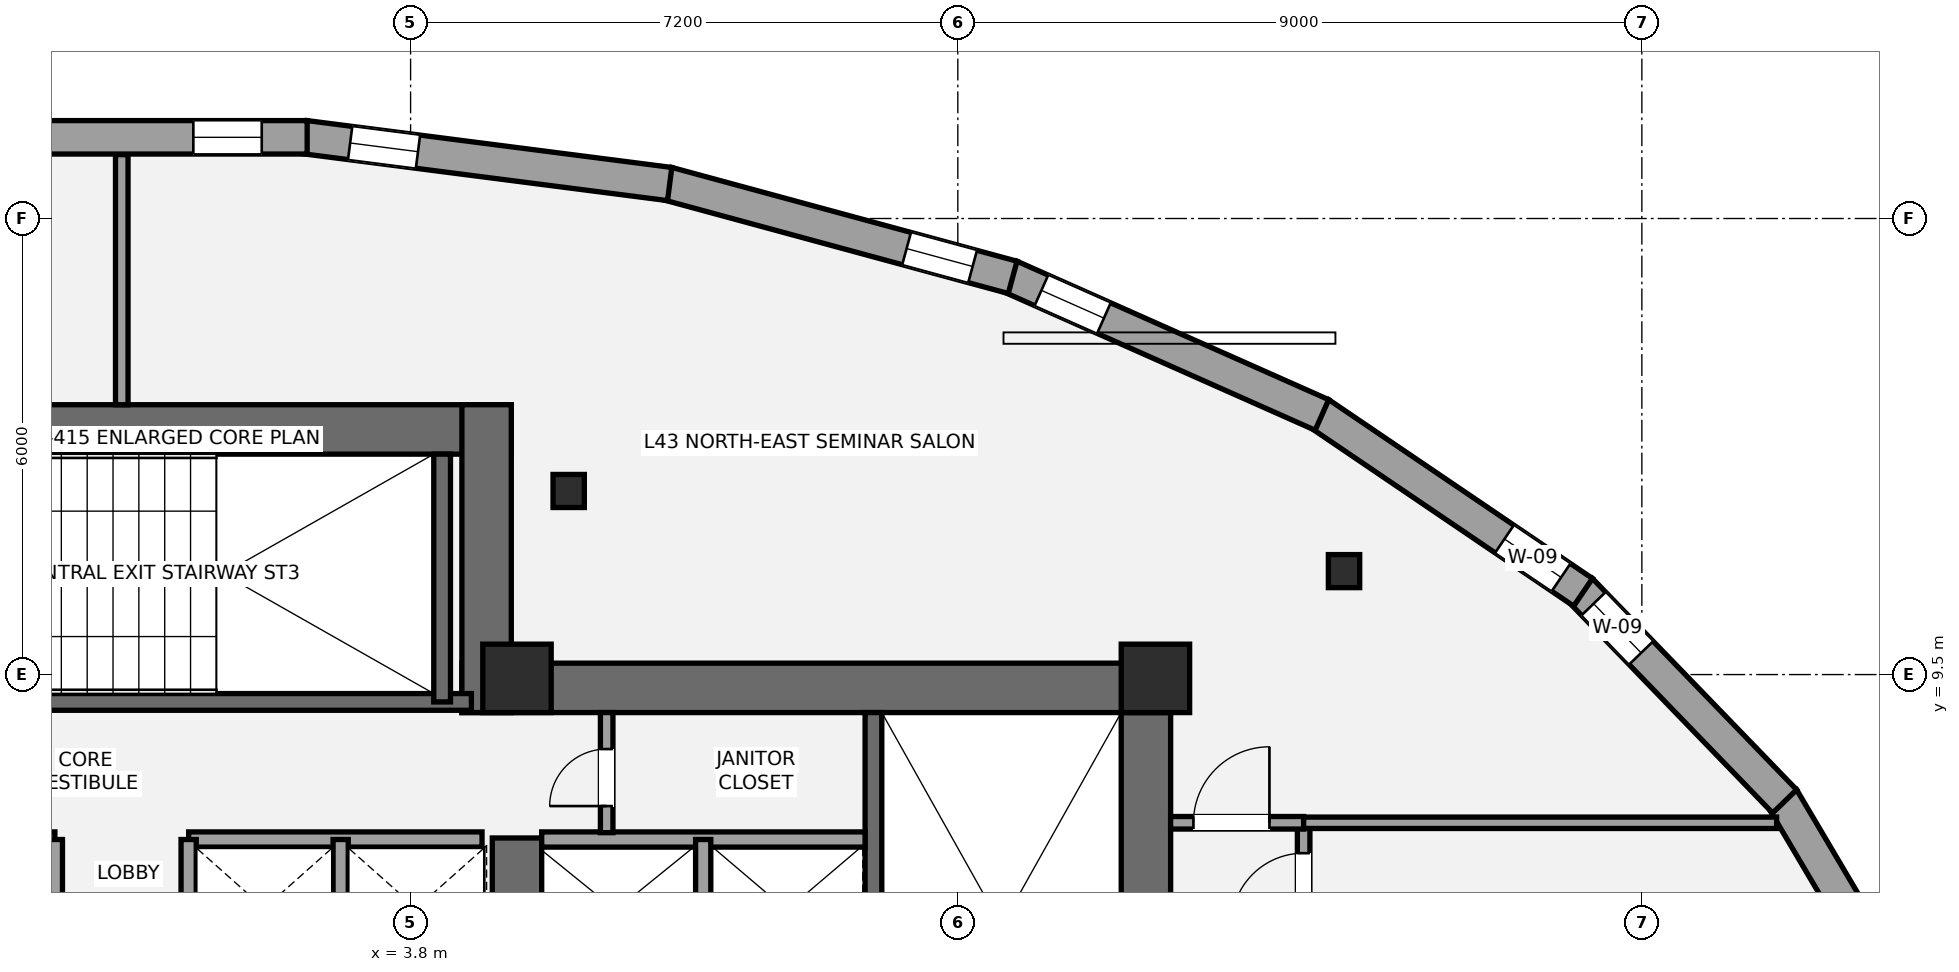
"""IFC4 building model, lengths in metres.
Left out: names, types, materials, properties, quantities, classifications, styles, units other than length and angle.
Written with IfcOpenShell. Run it as: python <this file> out.ifc"""

import sys

from ifc_helpers import new_model, si_unit, direction, frame, frame_2d, origin, origin_2d, place, context, subcontext, project, spatial, rectangle, i_section, extrude, element, fill, save


model = new_model("IFC4")
c1 = context("Model", 3, precision=1e-05, world=origin(), true_north=direction((0.0, 1.0)))
c2 = subcontext(c1, "Body", "Model", "MODEL_VIEW")
j1 = project(units=[si_unit("LENGTHUNIT", "METRE"), si_unit("PLANEANGLEUNIT", "RADIAN")], contexts=[c1])
p1 = place(None, origin())
s1 = spatial("IfcSite", under=j1, at=p1, CompositionType="ELEMENT")
p2 = place(p1, origin())
s2 = spatial("IfcBuilding", under=s1, at=p2, CompositionType="ELEMENT")
p3 = place(p2, frame((0.0, 0.0, 159.8)))
s3 = spatial("IfcBuildingStorey", under=s2, at=p3, CompositionType="ELEMENT", Elevation=159.8)
p4 = place(p3, frame((13.475, 1.2, 0.0), z_axis=(0.0, 0.0, 1.0), x_axis=(0.0, 1.0, 0.0)))
e1 = element("IfcWall", 1, at=p4, inside=s3, PredefinedType="SHEAR", context=c2, shape_type="SweptSolid", body=[
    extrude(rectangle(XDim=8.45, YDim=0.65, at=frame_2d((4.225, 0.0))), origin(), (0.0, 0.0, 1.0), 3.2),
])
p5 = place(p3, frame((4.475, 9.325, 0.0), z_axis=(0.0, 0.0, 1.0), x_axis=(1.0, 0.0, 0.0)))
e2 = element("IfcWall", 2, at=p5, inside=s3, PredefinedType="SHEAR", context=c2, shape_type="SweptSolid", body=[
    extrude(rectangle(XDim=9.325, YDim=0.65, at=frame_2d((4.663, 0.0))), origin(), (0.0, 0.0, 1.0), 3.2),
])
p6 = place(p3, frame((5.2, 5.35, 0.0), z_axis=(0.0, 0.0, 1.0), x_axis=(0.0, 1.0, 0.0)))
e3 = element("IfcWall", 3, at=p6, inside=s3, PredefinedType="SHEAR", context=c2, shape_type="SweptSolid", body=[
    extrude(rectangle(XDim=2.0, YDim=0.65, at=frame_2d((1.0, 0.0))), origin(), (0.0, 0.0, 1.0), 3.2),
])
p7 = place(p3, frame((9.89, 1.85, 0.0), z_axis=(0.0, 0.0, 1.0), x_axis=(0.0, 1.0, 0.0)))
e4 = element("IfcWall", 4, at=p7, inside=s3, PredefinedType="SHEAR", context=c2, shape_type="SweptSolid", body=[
    extrude(rectangle(XDim=7.15, YDim=0.22, at=frame_2d((3.575, 0.0))), origin(), (0.0, 0.0, 1.0), 3.2),
])
p8 = place(p3, frame((-5.125, 12.725, 0.0), z_axis=(0.0, 0.0, 1.0), x_axis=(1.0, 0.0, 0.0)))
e5 = element("IfcWall", 5, at=p8, inside=s3, PredefinedType="SHEAR", context=c2, shape_type="SweptSolid", body=[
    extrude(rectangle(XDim=10.25, YDim=0.65, at=frame_2d((5.125, 0.0))), origin(), (0.0, 0.0, 1.0), 3.2),
])
p9 = place(p3, frame((4.8, 9.0, 0.0), z_axis=(0.0, 0.0, 1.0), x_axis=(0.0, 1.0, 0.0)))
e6 = element("IfcWall", 6, at=p9, inside=s3, PredefinedType="SHEAR", context=c2, shape_type="SweptSolid", body=[
    extrude(rectangle(XDim=4.05, YDim=0.65, at=frame_2d((2.025, 0.0))), origin(), (0.0, 0.0, 1.0), 3.2),
])
p10 = place(p3, frame((-4.7, 9.14, 0.0), z_axis=(0.0, 0.0, 1.0), x_axis=(1.0, 0.0, 0.0)))
e7 = element("IfcWall", 7, at=p10, inside=s3, PredefinedType="SHEAR", context=c2, shape_type="SweptSolid", body=[
    extrude(rectangle(XDim=9.3, YDim=0.22, at=frame_2d((4.65, 0.0))), origin(), (0.0, 0.0, 1.0), 3.2),
])
p11 = place(p10, frame((1.15, 0.0, 0.0)))
e8 = element("IfcOpeningElement", 8, at=p11, cuts=e7, PredefinedType="OPENING", context=c2, shape_type="SweptSolid", body=[
    extrude(rectangle(XDim=1.05, YDim=2.15, at=frame_2d((0.525, 1.075))), frame((0.0, 0.12, 0.0), z_axis=(0.0, -1.0, 0.0), x_axis=(1.0, 0.0, 0.0)), (0.0, 0.0, 1.0), 0.24),
])
p12 = place(p3, frame((4.215, 9.14, 0.0), z_axis=(0.0, 0.0, 1.0), x_axis=(0.0, 1.0, 0.0)))
e9 = element("IfcWall", 9, at=p12, inside=s3, PredefinedType="SHEAR", context=c2, shape_type="SweptSolid", body=[
    extrude(rectangle(XDim=3.26, YDim=0.22, at=frame_2d((1.63, 0.0))), origin(), (0.0, 0.0, 1.0), 3.2),
])
for number, where, z_axis, x_axis in (
    (10, (5.2, 9.45, 0.0), (0.0, 0.0, 1.0), (1.0, 0.0, 0.0)),
    (11, (13.6, 9.45, 0.0), (0.0, 0.0, 1.0), (1.0, 0.0, 0.0)),
):
    element("IfcColumn", number, at=place(p3, frame(where, z_axis=z_axis, x_axis=x_axis)), inside=s3, PredefinedType="COLUMN", context=c2, shape_type="SweptSolid", body=[
        extrude(rectangle(XDim=0.9, YDim=0.9, at=origin_2d()), origin(), (0.0, 0.0, 1.0), 3.2),
    ])
for number, where, z_axis, x_axis in (
    (12, (16.082, 10.861, 0.0), (0.0, 0.0, 1.0), (1.0, 0.0, 0.0)),
    (13, (5.88, 11.915, 0.0), (0.0, 0.0, 1.0), (1.0, 0.0, 0.0)),
):
    element("IfcColumn", number, at=place(p3, frame(where, z_axis=z_axis, x_axis=x_axis)), inside=s3, PredefinedType="COLUMN", context=c2, shape_type="SweptSolid", body=[
        extrude(i_section(OverallWidth=0.412, OverallDepth=0.435, WebThickness=0.036, FlangeThickness=0.057, at=origin_2d()), origin(), (0.0, 0.0, 1.0), 3.2),
    ])
p13 = place(p3, frame((21.847, 7.873, 0.0), z_axis=(0.0, 0.0, 1.0), x_axis=(0.508883387051, -0.860835465338, 0.0)))
e14 = element("IfcWall", 14, at=p13, inside=s3, PredefinedType="STANDARD", context=c2, shape_type="SweptSolid", body=[
    extrude(rectangle(XDim=3.577, YDim=0.44, at=frame_2d((1.788, 0.0))), origin(), (0.0, 0.0, 1.0), 2.315),
])
p14 = place(p13, frame((2.537, 0.0, 0.42)))
e15 = element("IfcOpeningElement", 15, at=p14, cuts=e14, PredefinedType="OPENING", context=c2, shape_type="SweptSolid", body=[
    extrude(rectangle(XDim=0.9, YDim=1.35, at=frame_2d((0.45, 0.675))), frame((0.0, 0.23, 0.0), z_axis=(0.0, -1.0, 0.0), x_axis=(1.0, 0.0, 0.0)), (0.0, 0.0, 1.0), 0.46),
])
p15 = place(p3, frame((19.192, 10.612, 0.0), z_axis=(0.0, 0.0, 1.0), x_axis=(0.694975307772, -0.719033602544, 0.0)))
e16 = element("IfcWall", 16, at=p15, inside=s3, PredefinedType="STANDARD", context=c2, shape_type="SweptSolid", body=[
    extrude(rectangle(XDim=3.866, YDim=0.44, at=frame_2d((1.933, 0.0))), origin(), (0.0, 0.0, 1.0), 2.315),
])
p16 = place(p15, frame((0.25, 0.0, 0.42)))
e17 = element("IfcOpeningElement", 17, at=p16, cuts=e16, PredefinedType="OPENING", context=c2, shape_type="SweptSolid", body=[
    extrude(rectangle(XDim=0.9, YDim=1.35, at=frame_2d((0.45, 0.675))), frame((0.0, 0.23, 0.0), z_axis=(0.0, -1.0, 0.0), x_axis=(1.0, 0.0, 0.0)), (0.0, 0.0, 1.0), 0.46),
])
p17 = place(p3, frame((15.757, 12.935, 0.0), z_axis=(0.0, 0.0, 1.0), x_axis=(0.827760762475, -0.561081206338, 0.0)))
e18 = element("IfcWall", 18, at=p17, inside=s3, PredefinedType="STANDARD", context=c2, shape_type="SweptSolid", body=[
    extrude(rectangle(XDim=4.192, YDim=0.44, at=frame_2d((2.096, 0.0))), origin(), (0.0, 0.0, 1.0), 2.315),
])
p18 = place(p17, frame((2.942, 0.0, 0.58)))
e19 = element("IfcOpeningElement", 19, at=p18, cuts=e18, PredefinedType="OPENING", context=c2, shape_type="SweptSolid", body=[
    extrude(rectangle(XDim=0.9, YDim=1.35, at=frame_2d((0.45, 0.675))), frame((0.0, 0.23, 0.0), z_axis=(0.0, -1.0, 0.0), x_axis=(1.0, 0.0, 0.0)), (0.0, 0.0, 1.0), 0.46),
])
p19 = place(p3, frame((11.69, 14.737, 0.0), z_axis=(0.0, 0.0, 1.0), x_axis=(0.913907994914, -0.405921392431, 0.0)))
e20 = element("IfcWall", 20, at=p19, inside=s3, PredefinedType="STANDARD", context=c2, shape_type="SweptSolid", body=[
    extrude(rectangle(XDim=4.487, YDim=0.44, at=frame_2d((2.244, 0.0))), origin(), (0.0, 0.0, 1.0), 2.315),
])
p20 = place(p19, frame((0.449, 0.0, 0.58)))
e21 = element("IfcOpeningElement", 21, at=p20, cuts=e20, PredefinedType="OPENING", context=c2, shape_type="SweptSolid", body=[
    extrude(rectangle(XDim=0.9, YDim=1.35, at=frame_2d((0.45, 0.675))), frame((0.0, 0.23, 0.0), z_axis=(0.0, -1.0, 0.0), x_axis=(1.0, 0.0, 0.0)), (0.0, 0.0, 1.0), 0.46),
])
p21 = place(p3, frame((7.179, 15.959, 0.0), z_axis=(0.0, 0.0, 1.0), x_axis=(0.965037424263, -0.262112132058, 0.0)))
e22 = element("IfcWall", 22, at=p21, inside=s3, PredefinedType="STANDARD", context=c2, shape_type="SweptSolid", body=[
    extrude(rectangle(XDim=4.707, YDim=0.44, at=frame_2d((2.353, 0.0))), origin(), (0.0, 0.0, 1.0), 2.315),
])
p22 = place(p21, frame((3.261, 0.0, 0.58)))
e23 = element("IfcOpeningElement", 23, at=p22, cuts=e22, PredefinedType="OPENING", context=c2, shape_type="SweptSolid", body=[
    extrude(rectangle(XDim=0.9, YDim=1.35, at=frame_2d((0.45, 0.675))), frame((0.0, 0.23, 0.0), z_axis=(0.0, -1.0, 0.0), x_axis=(1.0, 0.0, 0.0)), (0.0, 0.0, 1.0), 0.46),
])
p23 = place(p3, frame((2.411, 16.57, 0.0), z_axis=(0.0, 0.0, 1.0), x_axis=(0.991852910824, -0.127388395426, 0.0)))
e24 = element("IfcWall", 24, at=p23, inside=s3, PredefinedType="STANDARD", context=c2, shape_type="SweptSolid", body=[
    extrude(rectangle(XDim=4.837, YDim=0.44, at=frame_2d((2.418, 0.0))), origin(), (0.0, 0.0, 1.0), 2.315),
])
p24 = place(p23, frame((0.598, 0.0, 0.58)))
e25 = element("IfcOpeningElement", 25, at=p24, cuts=e24, PredefinedType="OPENING", context=c2, shape_type="SweptSolid", body=[
    extrude(rectangle(XDim=0.9, YDim=1.35, at=frame_2d((0.45, 0.675))), frame((0.0, 0.23, 0.0), z_axis=(0.0, -1.0, 0.0), x_axis=(1.0, 0.0, 0.0)), (0.0, 0.0, 1.0), 0.46),
])
p25 = place(p3, frame((-2.439, 16.568, 0.0), z_axis=(0.0, 0.0, 1.0), x_axis=(1.0, 0.0, 0.0)))
e26 = element("IfcWall", 26, at=p25, inside=s3, PredefinedType="STANDARD", context=c2, shape_type="SweptSolid", body=[
    extrude(rectangle(XDim=4.878, YDim=0.44, at=frame_2d((2.439, 0.0))), origin(), (0.0, 0.0, 1.0), 2.315),
])
p26 = place(p25, frame((3.381, 0.0, 0.58)))
e27 = element("IfcOpeningElement", 27, at=p26, cuts=e26, PredefinedType="OPENING", context=c2, shape_type="SweptSolid", body=[
    extrude(rectangle(XDim=0.9, YDim=1.35, at=frame_2d((0.45, 0.675))), frame((0.0, 0.23, 0.0), z_axis=(0.0, -1.0, 0.0), x_axis=(1.0, 0.0, 0.0)), (0.0, 0.0, 1.0), 0.46),
])
p27 = place(p3, frame((5.525, 7.33, 0.0), z_axis=(0.0, 0.0, 1.0), x_axis=(1.0, 0.0, 0.0)))
e28 = element("IfcWall", 28, at=p27, inside=s3, PredefinedType="SOLIDWALL", context=c2, shape_type="SweptSolid", body=[
    extrude(rectangle(XDim=4.255, YDim=0.2, at=frame_2d((2.127, 0.0))), origin(), (0.0, 0.0, 1.0), 3.02),
])
p28 = place(p3, frame((7.65, 5.47, 0.0), z_axis=(0.0, 0.0, 1.0), x_axis=(0.0, 1.0, 0.0)))
e29 = element("IfcWall", 29, at=p28, inside=s3, PredefinedType="SOLIDWALL", context=c2, shape_type="SweptSolid", body=[
    extrude(rectangle(XDim=1.86, YDim=0.2, at=frame_2d((0.93, 0.0))), origin(), (0.0, 0.0, 1.0), 3.02),
])
for number, where, z_axis, x_axis in (
    (30, (-4.74, 7.33, 0.0), (0.0, 0.0, 1.0), (1.0, 0.0, 0.0)),
    (31, (0.88, 7.33, 0.0), (0.0, 0.0, 1.0), (1.0, 0.0, 0.0)),
):
    element("IfcWall", number, at=place(p3, frame(where, z_axis=z_axis, x_axis=x_axis)), inside=s3, PredefinedType="SOLIDWALL", context=c2, shape_type="SweptSolid", body=[
        extrude(rectangle(XDim=3.86, YDim=0.2, at=frame_2d((1.93, 0.0))), origin(), (0.0, 0.0, 1.0), 3.02),
    ])
for number, where, z_axis, x_axis in (
    (32, (2.88, 5.52, 0.0), (0.0, 0.0, 1.0), (0.0, 1.0, 0.0)),
    (33, (-0.88, 5.52, 0.0), (0.0, 0.0, 1.0), (0.0, 1.0, 0.0)),
    (34, (0.88, 5.52, 0.0), (0.0, 0.0, 1.0), (0.0, 1.0, 0.0)),
):
    element("IfcWall", number, at=place(p3, frame(where, z_axis=z_axis, x_axis=x_axis)), inside=s3, PredefinedType="SOLIDWALL", context=c2, shape_type="SweptSolid", body=[
        extrude(rectangle(XDim=1.81, YDim=0.2, at=frame_2d((0.905, 0.0))), origin(), (0.0, 0.0, 1.0), 3.02),
    ])
p29 = place(p3, frame((6.38, 7.42, 0.0), z_axis=(0.0, 0.0, 1.0), x_axis=(0.0, 1.0, 0.0)))
e35 = element("IfcWall", 35, at=p29, inside=s3, PredefinedType="PARTITIONING", context=c2, shape_type="SweptSolid", body=[
    extrude(rectangle(XDim=1.58, YDim=0.165, at=frame_2d((0.79, 0.0))), origin(), (0.0, 0.0, 1.0), 3.02),
])
p30 = place(p29, frame((0.35, 0.0, 0.0)))
e36 = element("IfcOpeningElement", 36, at=p30, cuts=e35, PredefinedType="OPENING", context=c2, shape_type="SweptSolid", body=[
    extrude(rectangle(XDim=0.75, YDim=2.1, at=frame_2d((0.375, 1.05))), frame((0.0, 0.093, 0.0), z_axis=(0.0, -1.0, 0.0), x_axis=(1.0, 0.0, 0.0)), (0.0, 0.0, 1.0), 0.185),
])
p31 = place(p3, frame((15.55, -12.773, 0.0), z_axis=(0.0, 0.0, 1.0), x_axis=(0.0, 1.0, 0.0)))
e37 = element("IfcWall", 37, at=p31, inside=s3, PredefinedType="PARTITIONING", context=c2, shape_type="SweptSolid", body=[
    extrude(rectangle(XDim=20.323, YDim=0.165, at=frame_2d((10.162, 0.0))), origin(), (0.0, 0.0, 1.0), 2.473),
])
p32 = place(p31, frame((5.773, 0.0, 0.0)))
e38 = element("IfcOpeningElement", 38, at=p32, cuts=e37, PredefinedType="OPENING", context=c2, shape_type="SweptSolid", body=[
    extrude(rectangle(XDim=0.85, YDim=2.1, at=frame_2d((0.425, 1.05))), frame((0.0, 0.093, 0.0), z_axis=(0.0, -1.0, 0.0), x_axis=(1.0, 0.0, 0.0)), (0.0, 0.0, 1.0), 0.185),
])
p33 = place(p31, frame((9.823, 0.0, 0.0)))
e39 = element("IfcOpeningElement", 39, at=p33, cuts=e37, PredefinedType="OPENING", context=c2, shape_type="SweptSolid", body=[
    extrude(rectangle(XDim=0.95, YDim=2.15, at=frame_2d((0.475, 1.075))), frame((0.0, 0.093, 0.0), z_axis=(0.0, -1.0, 0.0), x_axis=(1.0, 0.0, 0.0)), (0.0, 0.0, 1.0), 0.185),
])
p34 = place(p31, frame((14.223, 0.0, 0.0)))
e40 = element("IfcOpeningElement", 40, at=p34, cuts=e37, PredefinedType="OPENING", context=c2, shape_type="SweptSolid", body=[
    extrude(rectangle(XDim=0.95, YDim=2.15, at=frame_2d((0.475, 1.075))), frame((0.0, 0.093, 0.0), z_axis=(0.0, -1.0, 0.0), x_axis=(1.0, 0.0, 0.0)), (0.0, 0.0, 1.0), 0.185),
])
p35 = place(p31, frame((18.973, 0.0, 0.0)))
e41 = element("IfcOpeningElement", 41, at=p35, cuts=e37, PredefinedType="OPENING", context=c2, shape_type="SweptSolid", body=[
    extrude(rectangle(XDim=0.95, YDim=2.15, at=frame_2d((0.475, 1.075))), frame((0.0, 0.093, 0.0), z_axis=(0.0, -1.0, 0.0), x_axis=(1.0, 0.0, 0.0)), (0.0, 0.0, 1.0), 0.185),
])
p36 = place(p3, frame((13.8, 7.55, 0.0), z_axis=(0.0, 0.0, 1.0), x_axis=(1.0, 0.0, 0.0)))
e42 = element("IfcWall", 42, at=p36, inside=s3, PredefinedType="PARTITIONING", context=c2, shape_type="SweptSolid", body=[
    extrude(rectangle(XDim=1.75, YDim=0.165, at=frame_2d((0.875, 0.0))), origin(), (0.0, 0.0, 1.0), 2.473),
])
p37 = place(p36, frame((0.3, 0.0, 0.0)))
e43 = element("IfcOpeningElement", 43, at=p37, cuts=e42, PredefinedType="OPENING", context=c2, shape_type="SweptSolid", body=[
    extrude(rectangle(XDim=1.0, YDim=2.15, at=frame_2d((0.5, 1.075))), frame((0.0, 0.093, 0.0), z_axis=(0.0, -1.0, 0.0), x_axis=(1.0, 0.0, 0.0)), (0.0, 0.0, 1.0), 0.185),
])
p38 = place(p3, frame((15.55, 7.55, 0.0), z_axis=(0.0, 0.0, 1.0), x_axis=(1.0, 0.0, 0.0)))
e44 = element("IfcWall", 44, at=p38, inside=s3, PredefinedType="PLUMBINGWALL", context=c2, shape_type="SweptSolid", body=[
    extrude(rectangle(XDim=6.223, YDim=0.15, at=frame_2d((3.112, 0.0))), origin(), (0.0, 0.0, 1.0), 2.473),
])
p39 = place(p3, frame((0.0, 13.05, 0.0), z_axis=(0.0, 0.0, 1.0), x_axis=(0.0, 1.0, 0.0)))
e45 = element("IfcWall", 45, at=p39, inside=s3, PredefinedType="PARTITIONING", context=c2, shape_type="SweptSolid", body=[
    extrude(rectangle(XDim=3.29, YDim=0.165, at=frame_2d((1.645, 0.0))), origin(), (0.0, 0.0, 1.0), 3.02),
])
p40 = place(p16, origin())
e46 = element("IfcWindow", 46, at=p40, inside=s3, PartitioningType="SINGLE_PANEL", PredefinedType="WINDOW", context=c2, shape_type="SweptSolid", body=[
    extrude(rectangle(XDim=0.9, YDim=1.35, at=frame_2d((0.45, 0.675))), frame((0.0, -0.01, 0.0), z_axis=(0.0, -1.0, 0.0), x_axis=(1.0, 0.0, 0.0)), (0.0, 0.0, 1.0), 0.06),
])
fill(e17, e46)
p41 = place(p18, origin())
e47 = element("IfcWindow", 47, at=p41, inside=s3, PartitioningType="SINGLE_PANEL", PredefinedType="WINDOW", context=c2, shape_type="SweptSolid", body=[
    extrude(rectangle(XDim=0.9, YDim=1.35, at=frame_2d((0.45, 0.675))), frame((0.0, -0.01, 0.0), z_axis=(0.0, -1.0, 0.0), x_axis=(1.0, 0.0, 0.0)), (0.0, 0.0, 1.0), 0.06),
])
fill(e19, e47)
p42 = place(p20, origin())
e48 = element("IfcWindow", 48, at=p42, inside=s3, PartitioningType="SINGLE_PANEL", PredefinedType="WINDOW", context=c2, shape_type="SweptSolid", body=[
    extrude(rectangle(XDim=0.9, YDim=1.35, at=frame_2d((0.45, 0.675))), frame((0.0, -0.01, 0.0), z_axis=(0.0, -1.0, 0.0), x_axis=(1.0, 0.0, 0.0)), (0.0, 0.0, 1.0), 0.06),
])
fill(e21, e48)
p43 = place(p22, origin())
e49 = element("IfcWindow", 49, at=p43, inside=s3, PartitioningType="SINGLE_PANEL", PredefinedType="WINDOW", context=c2, shape_type="SweptSolid", body=[
    extrude(rectangle(XDim=0.9, YDim=1.35, at=frame_2d((0.45, 0.675))), frame((0.0, -0.01, 0.0), z_axis=(0.0, -1.0, 0.0), x_axis=(1.0, 0.0, 0.0)), (0.0, 0.0, 1.0), 0.06),
])
fill(e23, e49)
p44 = place(p24, origin())
e50 = element("IfcWindow", 50, at=p44, inside=s3, PartitioningType="SINGLE_PANEL", PredefinedType="WINDOW", context=c2, shape_type="SweptSolid", body=[
    extrude(rectangle(XDim=0.9, YDim=1.35, at=frame_2d((0.45, 0.675))), frame((0.0, -0.01, 0.0), z_axis=(0.0, -1.0, 0.0), x_axis=(1.0, 0.0, 0.0)), (0.0, 0.0, 1.0), 0.06),
])
fill(e25, e50)
p45 = place(p26, origin())
e51 = element("IfcWindow", 51, at=p45, inside=s3, PartitioningType="SINGLE_PANEL", PredefinedType="WINDOW", context=c2, shape_type="SweptSolid", body=[
    extrude(rectangle(XDim=0.9, YDim=1.35, at=frame_2d((0.45, 0.675))), frame((0.0, -0.01, 0.0), z_axis=(0.0, -1.0, 0.0), x_axis=(1.0, 0.0, 0.0)), (0.0, 0.0, 1.0), 0.06),
])
fill(e27, e51)
p46 = place(p30, origin())
e52 = element("IfcDoor", 52, at=p46, inside=s3, OperationType="SINGLE_SWING_LEFT", PredefinedType="DOOR", context=c2, shape_type="SweptSolid", body=[
    extrude(rectangle(XDim=0.75, YDim=2.1, at=frame_2d((0.375, 1.05))), frame((0.0, 0.025, 0.0), z_axis=(0.0, -1.0, 0.0), x_axis=(1.0, 0.0, 0.0)), (0.0, 0.0, 1.0), 0.05),
])
fill(e36, e52)
p47 = place(p37, origin())
e53 = element("IfcDoor", 53, at=p47, inside=s3, OperationType="SINGLE_SWING_RIGHT", PredefinedType="DOOR", context=c2, shape_type="SweptSolid", body=[
    extrude(rectangle(XDim=1.0, YDim=2.15, at=frame_2d((0.5, 1.075))), frame((0.0, 0.025, 0.0), z_axis=(0.0, -1.0, 0.0), x_axis=(1.0, 0.0, 0.0)), (0.0, 0.0, 1.0), 0.05),
])
fill(e43, e53)
p48 = place(p35, origin())
e54 = element("IfcDoor", 54, at=p48, inside=s3, OperationType="SINGLE_SWING_LEFT", PredefinedType="DOOR", context=c2, shape_type="SweptSolid", body=[
    extrude(rectangle(XDim=0.95, YDim=2.15, at=frame_2d((0.475, 1.075))), frame((0.0, 0.025, 0.0), z_axis=(0.0, -1.0, 0.0), x_axis=(1.0, 0.0, 0.0)), (0.0, 0.0, 1.0), 0.05),
])
fill(e41, e54)
save(model, sys.argv[1])
